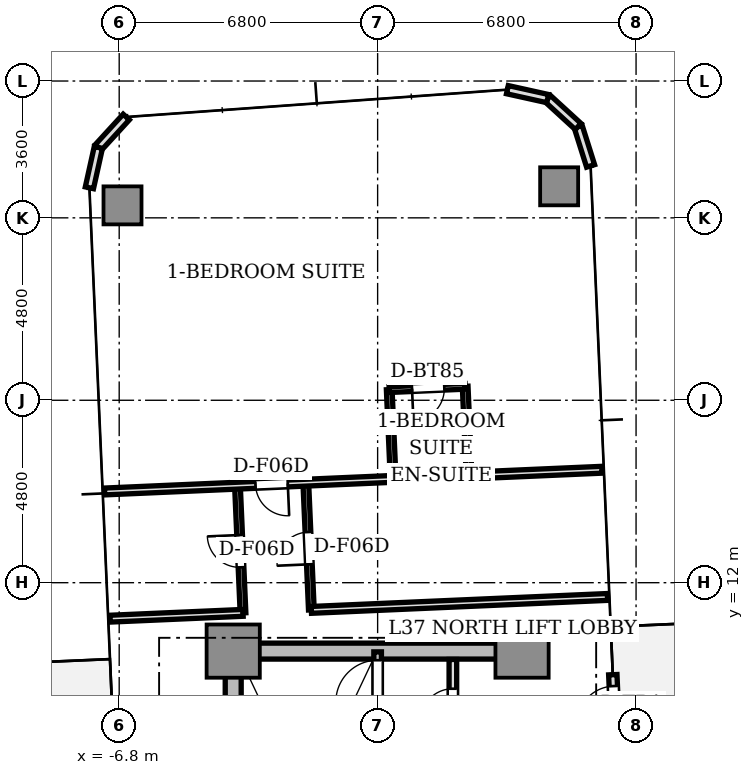
"""IFC4 building model, lengths in metres.
Left out: names, types, materials, properties, quantities, classifications, styles, units other than length and angle.
Written with IfcOpenShell. Run it as: python <this file> out.ifc"""

import sys

from ifc_helpers import new_model, si_unit, direction, frame, frame_2d, origin, origin_2d, place, context, subcontext, project, spatial, rectangle, extrude, source, transform, mapped, element, fill, save


model = new_model("IFC4")
c1 = context("Model", 3, precision=1e-05, world=origin(), true_north=direction((0.0, 1.0)))
c2 = subcontext(c1, "Body", "Model", "MODEL_VIEW")
j1 = project(units=[si_unit("LENGTHUNIT", "METRE"), si_unit("PLANEANGLEUNIT", "RADIAN")], contexts=[c1])
p1 = place(None, origin())
s1 = spatial("IfcSite", under=j1, at=p1, CompositionType="ELEMENT")
p2 = place(p1, origin())
s2 = spatial("IfcBuilding", under=s1, at=p2, CompositionType="ELEMENT")
p3 = place(p2, frame((0.0, 0.0, 134.9)))
s3 = spatial("IfcBuildingStorey", under=s2, at=p3, CompositionType="ELEMENT", Elevation=134.9)
p4 = place(p3, frame((-3.55, 10.2, 0.0), z_axis=(0.0, 0.0, 1.0), x_axis=(1.0, 0.0, 0.0)))
e1 = element("IfcWall", 1, at=p4, inside=s3, PredefinedType="SHEAR", context=c2, shape_type="SweptSolid", body=[
    extrude(rectangle(XDim=7.1, YDim=0.42, at=frame_2d((3.55, 0.0))), origin(), (0.0, 0.0, 1.0), 3.03),
])
p5 = place(p3, frame((-3.8, 2.85, 0.0), z_axis=(0.0, 0.0, 1.0), x_axis=(0.0, 1.0, 0.0)))
e2 = element("IfcWall", 2, at=p5, inside=s3, PredefinedType="SHEAR", context=c2, shape_type="SweptSolid", body=[
    extrude(rectangle(XDim=6.9, YDim=0.42, at=frame_2d((3.45, 0.0))), origin(), (0.0, 0.0, 1.0), 3.03),
])
m1 = source(origin(), c2, "Body", "SweptSolid", [
    extrude(rectangle(XDim=1.4, YDim=1.4, at=origin_2d()), origin(), (0.0, 0.0, 1.0), 3.03),
])
for number, where, z_axis, x_axis in (
    (3, (-3.8, 10.2, 0.0), (0.0, 0.0, 1.0), (1.0, 0.0, 0.0)),
    (4, (3.8, 10.2, 0.0), (0.0, 0.0, 1.0), (1.0, 0.0, 0.0)),
):
    element("IfcColumn", number, at=place(p3, frame(where, z_axis=z_axis, x_axis=x_axis)), inside=s3, PredefinedType="COLUMN", context=c2, shape_type="MappedRepresentation", body=[
        mapped(m1, transform((0.0, 0.0, 0.0), scale=1.0)),
    ])
m2 = source(origin(), c2, "Body", "SweptSolid", [
    extrude(rectangle(XDim=1.0, YDim=1.0, at=origin_2d()), origin(), (0.0, 0.0, 1.0), 3.03),
])
for number, where, z_axis, x_axis in (
    (5, (4.776, 22.43, 0.0), (0.0, 0.0, 1.0), (1.0, 0.0, 0.0)),
    (6, (-6.713, 21.928, 0.0), (0.0, 0.0, 1.0), (1.0, 0.0, 0.0)),
):
    element("IfcColumn", number, at=place(p3, frame(where, z_axis=z_axis, x_axis=x_axis)), inside=s3, PredefinedType="COLUMN", context=c2, shape_type="MappedRepresentation", body=[
        mapped(m2, transform((0.0, 0.0, 0.0), scale=1.0)),
    ])
p6 = place(p3, frame((6.306, 6.882, 0.0), z_axis=(0.0, 0.0, 1.0), x_axis=(-0.043672655174, 0.999045894436, 0.0)))
e7 = element("IfcWall", 7, at=p6, inside=s3, PredefinedType="STANDARD", context=c2, shape_type="SweptSolid", body=[
    extrude(rectangle(XDim=2.7, YDim=0.22, at=frame_2d((1.35, 0.0))), origin(), (0.0, 0.0, 1.0), 3.03),
])
p7 = place(p6, frame((1.4, 0.0, 0.0)))
e8 = element("IfcOpeningElement", 8, at=p7, cuts=e7, PredefinedType="OPENING", context=c2, shape_type="SweptSolid", body=[
    extrude(rectangle(XDim=1.0, YDim=2.2, at=frame_2d((0.5, 1.1))), frame((0.0, 0.12, 0.0), z_axis=(0.0, -1.0, 0.0), x_axis=(1.0, 0.0, 0.0)), (0.0, 0.0, 1.0), 0.24),
])
p8 = place(p3, frame((5.604, 22.966, 0.0), z_axis=(0.0, 0.0, 1.0), x_axis=(-0.300755105707, 0.953701403161, 0.0)))
e9 = element("IfcWall", 9, at=p8, inside=s3, PredefinedType="STANDARD", context=c2, shape_type="SweptSolid", body=[
    extrude(rectangle(XDim=1.087, YDim=0.22, at=frame_2d((0.543, 0.0))), origin(), (0.0, 0.0, 1.0), 3.03),
])
p9 = place(p3, frame((5.277, 24.003, 0.0), z_axis=(0.0, 0.0, 1.0), x_axis=(-0.737312600672, 0.675551721847, 0.0)))
e10 = element("IfcWall", 10, at=p9, inside=s3, PredefinedType="STANDARD", context=c2, shape_type="SweptSolid", body=[
    extrude(rectangle(XDim=1.087, YDim=0.22, at=frame_2d((0.543, 0.0))), origin(), (0.0, 0.0, 1.0), 3.03),
])
for number, where, z_axis, x_axis in (
    (11, (4.475, 24.737, 0.0), (0.0, 0.0, 1.0), (-0.976, 0.217, 0.0)),
    (12, (-6.614, 24.253, 0.0), (0.0, 0.0, 1.0), (-0.676, -0.737, 0.0)),
):
    element("IfcWall", number, at=place(p3, frame(where, z_axis=z_axis, x_axis=x_axis)), inside=s3, PredefinedType="STANDARD", context=c2, shape_type="SweptSolid", body=[
        extrude(rectangle(XDim=1.087, YDim=0.22, at=frame_2d((0.543, 0.0))), origin(), (0.0, 0.0, 1.0), 3.03),
    ])
p10 = place(p3, frame((-7.349, 23.452, 0.0), z_axis=(0.0, 0.0, 1.0), x_axis=(-0.216454939174, -0.976292609471, 0.0)))
e13 = element("IfcWall", 13, at=p10, inside=s3, PredefinedType="STANDARD", context=c2, shape_type="SweptSolid", body=[
    extrude(rectangle(XDim=1.087, YDim=0.22, at=frame_2d((0.544, 0.0))), origin(), (0.0, 0.0, 1.0), 3.03),
])
p11 = place(p3, frame((0.0, 2.5, 0.0), z_axis=(0.0, 0.0, 1.0), x_axis=(0.0, 1.0, 0.0)))
e14 = element("IfcWall", 14, at=p11, inside=s3, PredefinedType="SOLIDWALL", context=c2, shape_type="SweptSolid", body=[
    extrude(rectangle(XDim=7.68, YDim=0.2, at=frame_2d((3.84, 0.0))), origin(), (0.0, 0.0, 1.0), 3.03),
])
p12 = place(p11, frame((6.36, 0.0, 0.0)))
e15 = element("IfcOpeningElement", 15, at=p12, cuts=e14, PredefinedType="OPENING", context=c2, shape_type="SweptSolid", body=[
    extrude(rectangle(XDim=1.1, YDim=2.15, at=frame_2d((0.55, 1.075))), frame((0.0, 0.11, 0.0), z_axis=(0.0, -1.0, 0.0), x_axis=(1.0, 0.0, 0.0)), (0.0, 0.0, 1.0), 0.22),
])
p13 = place(p3, frame((1.98, 5.32, 0.0), z_axis=(0.0, 0.0, 1.0), x_axis=(0.0, 1.0, 0.0)))
e16 = element("IfcWall", 16, at=p13, inside=s3, PredefinedType="SOLIDWALL", context=c2, shape_type="SweptSolid", body=[
    extrude(rectangle(XDim=4.66, YDim=0.2, at=frame_2d((2.33, 0.0))), origin(), (0.0, 0.0, 1.0), 2.58),
])
p14 = place(p13, frame((3.04, 0.0, 0.0)))
e17 = element("IfcOpeningElement", 17, at=p14, cuts=e16, PredefinedType="OPENING", context=c2, shape_type="SweptSolid", body=[
    extrude(rectangle(XDim=0.85, YDim=2.1, at=frame_2d((0.425, 1.05))), frame((0.0, 0.11, 0.0), z_axis=(0.0, -1.0, 0.0), x_axis=(1.0, 0.0, 0.0)), (0.0, 0.0, 1.0), 0.22),
])
p15 = place(p3, frame((-3.542, 11.206, 0.0), z_axis=(0.0, 0.0, 1.0), x_axis=(-0.043582710367, 0.99904982226, 0.0)))
e18 = element("IfcWall", 18, at=p15, inside=s3, PredefinedType="PARTITIONING", context=c2, shape_type="SweptSolid", body=[
    extrude(rectangle(XDim=3.35, YDim=0.15, at=frame_2d((1.675, 0.0))), origin(), (0.0, 0.0, 1.0), 2.58),
])
p16 = place(p15, frame((1.2, 0.0, 0.0)))
e19 = element("IfcOpeningElement", 19, at=p16, cuts=e18, PredefinedType="OPENING", context=c2, shape_type="SweptSolid", body=[
    extrude(rectangle(XDim=0.85, YDim=2.1, at=frame_2d((0.425, 1.05))), frame((0.0, 0.085, 0.0), z_axis=(0.0, -1.0, 0.0), x_axis=(1.0, 0.0, 0.0)), (0.0, 0.0, 1.0), 0.17),
])
p17 = place(p3, frame((-1.744, 11.285, 0.0), z_axis=(0.0, 0.0, 1.0), x_axis=(-0.043579537274, 0.999049960678, 0.0)))
e20 = element("IfcWall", 20, at=p17, inside=s3, PredefinedType="PARTITIONING", context=c2, shape_type="SweptSolid", body=[
    extrude(rectangle(XDim=3.35, YDim=0.15, at=frame_2d((1.675, 0.0))), origin(), (0.0, 0.0, 1.0), 2.58),
])
p18 = place(p17, frame((1.2, 0.0, 0.0)))
e21 = element("IfcOpeningElement", 21, at=p18, cuts=e20, PredefinedType="OPENING", context=c2, shape_type="SweptSolid", body=[
    extrude(rectangle(XDim=0.85, YDim=2.1, at=frame_2d((0.425, 1.05))), frame((0.0, 0.085, 0.0), z_axis=(0.0, -1.0, 0.0), x_axis=(1.0, 0.0, 0.0)), (0.0, 0.0, 1.0), 0.17),
])
p19 = place(p3, frame((-3.542, 11.206, 0.0), z_axis=(0.0, 0.0, 1.0), x_axis=(-0.999046129111, -0.04366728647, 0.0)))
e22 = element("IfcWall", 22, at=p19, inside=s3, PredefinedType="PARTITIONING", context=c2, shape_type="SweptSolid", body=[
    extrude(rectangle(XDim=3.5, YDim=0.18, at=frame_2d((1.75, 0.0))), origin(), (0.0, 0.0, 1.0), 2.58),
])
p20 = place(p3, frame((6.049, 11.625, 0.0), z_axis=(0.0, 0.0, 1.0), x_axis=(-0.999047634936, -0.043632821702, 0.0)))
e23 = element("IfcWall", 23, at=p20, inside=s3, PredefinedType="PARTITIONING", context=c2, shape_type="SweptSolid", body=[
    extrude(rectangle(XDim=7.8, YDim=0.18, at=frame_2d((3.9, 0.0))), origin(), (0.0, 0.0, 1.0), 2.58),
])
p21 = place(p3, frame((5.903, 14.972, 0.0), z_axis=(0.0, 0.0, 1.0), x_axis=(-0.999048653727, -0.043609488494, 0.0)))
e24 = element("IfcWall", 24, at=p21, inside=s3, PredefinedType="PARTITIONING", context=c2, shape_type="SweptSolid", body=[
    extrude(rectangle(XDim=13.1, YDim=0.18, at=frame_2d((6.55, 0.0))), origin(), (0.0, 0.0, 1.0), 2.58),
])
p22 = place(p21, frame((8.275, 0.0, 0.0)))
e25 = element("IfcOpeningElement", 25, at=p22, cuts=e24, PredefinedType="OPENING", context=c2, shape_type="SweptSolid", body=[
    extrude(rectangle(XDim=0.85, YDim=2.1, at=frame_2d((0.425, 1.05))), frame((0.0, 0.1, 0.0), z_axis=(0.0, -1.0, 0.0), x_axis=(1.0, 0.0, 0.0)), (0.0, 0.0, 1.0), 0.2),
])
p23 = place(p3, frame((0.408, 14.732, 0.0), z_axis=(0.0, 0.0, 1.0), x_axis=(-0.043527387554, 0.999052234136, 0.0)))
e26 = element("IfcWall", 26, at=p23, inside=s3, PredefinedType="PARTITIONING", context=c2, shape_type="SweptSolid", body=[
    extrude(rectangle(XDim=2.35, YDim=0.15, at=frame_2d((1.175, 0.0))), origin(), (0.0, 0.0, 1.0), 2.58),
])
p24 = place(p3, frame((2.406, 14.819, 0.0), z_axis=(0.0, 0.0, 1.0), x_axis=(-0.04363560271, 0.999047513473, 0.0)))
e27 = element("IfcWall", 27, at=p24, inside=s3, PredefinedType="PARTITIONING", context=c2, shape_type="SweptSolid", body=[
    extrude(rectangle(XDim=2.35, YDim=0.15, at=frame_2d((1.175, 0.0))), origin(), (0.0, 0.0, 1.0), 2.58),
])
p25 = place(p3, frame((2.303, 17.167, 0.0), z_axis=(0.0, 0.0, 1.0), x_axis=(-0.999049929275, -0.043580257179, 0.0)))
e28 = element("IfcWall", 28, at=p25, inside=s3, PredefinedType="PARTITIONING", context=c2, shape_type="SweptSolid", body=[
    extrude(rectangle(XDim=2.0, YDim=0.15, at=frame_2d((1.0, 0.0))), origin(), (0.0, 0.0, 1.0), 2.58),
])
p26 = place(p25, frame((0.55, 0.0, 0.0)))
e29 = element("IfcOpeningElement", 29, at=p26, cuts=e28, PredefinedType="OPENING", context=c2, shape_type="SweptSolid", body=[
    extrude(rectangle(XDim=0.85, YDim=2.1, at=frame_2d((0.425, 1.05))), frame((0.0, 0.085, 0.0), z_axis=(0.0, -1.0, 0.0), x_axis=(1.0, 0.0, 0.0)), (0.0, 0.0, 1.0), 0.17),
])
m3 = source(origin(), c2, "Body", "SweptSolid", [
    extrude(rectangle(XDim=1.0, YDim=0.05, at=origin_2d()), origin(), (0.0, 0.0, 1.0), 2.2),
])
p27 = place(p7, frame((0.5, 0.0, 0.0)))
e30 = element("IfcDoor", 30, at=p27, inside=s3, OperationType="SINGLE_SWING_LEFT", PredefinedType="DOOR", context=c2, shape_type="MappedRepresentation", body=[
    mapped(m3, transform((0.0, 0.0, 0.0), scale=1.0)),
])
fill(e8, e30)
m4 = source(origin(), c2, "Body", "SweptSolid", [
    extrude(rectangle(XDim=1.1, YDim=0.05, at=origin_2d()), origin(), (0.0, 0.0, 1.0), 2.15),
])
p28 = place(p12, frame((0.55, 0.0, 0.0)))
e31 = element("IfcDoor", 31, at=p28, inside=s3, OperationType="SINGLE_SWING_LEFT", PredefinedType="DOOR", context=c2, shape_type="MappedRepresentation", body=[
    mapped(m4, transform((0.0, 0.0, 0.0), scale=1.0)),
])
fill(e15, e31)
m5 = source(origin(), c2, "Body", "SweptSolid", [
    extrude(rectangle(XDim=0.85, YDim=0.05, at=origin_2d()), origin(), (0.0, 0.0, 1.0), 2.1),
])
p29 = place(p14, frame((0.425, 0.0, 0.0)))
e32 = element("IfcDoor", 32, at=p29, inside=s3, OperationType="SINGLE_SWING_LEFT", PredefinedType="DOOR", context=c2, shape_type="MappedRepresentation", body=[
    mapped(m5, transform((0.0, 0.0, 0.0), scale=1.0)),
])
fill(e17, e32)
p30 = place(p16, frame((0.425, 0.0, 0.0)))
e33 = element("IfcDoor", 33, at=p30, inside=s3, OperationType="SINGLE_SWING_RIGHT", PredefinedType="DOOR", context=c2, shape_type="MappedRepresentation", body=[
    mapped(m5, transform((0.0, 0.0, 0.0), scale=1.0)),
])
fill(e19, e33)
p31 = place(p18, frame((0.425, 0.0, 0.0)))
e34 = element("IfcDoor", 34, at=p31, inside=s3, OperationType="SINGLE_SWING_LEFT", PredefinedType="DOOR", context=c2, shape_type="MappedRepresentation", body=[
    mapped(m5, transform((0.0, 0.0, 0.0), scale=1.0)),
])
fill(e21, e34)
p32 = place(p26, frame((0.425, 0.0, 0.0)))
e35 = element("IfcDoor", 35, at=p32, inside=s3, OperationType="SINGLE_SWING_RIGHT", PredefinedType="DOOR", context=c2, shape_type="MappedRepresentation", body=[
    mapped(m5, transform((0.0, 0.0, 0.0), scale=1.0)),
])
fill(e29, e35)
p33 = place(p22, frame((0.425, 0.0, 0.0)))
e36 = element("IfcDoor", 36, at=p33, inside=s3, OperationType="SINGLE_SWING_LEFT", PredefinedType="DOOR", context=c2, shape_type="MappedRepresentation", body=[
    mapped(m5, transform((0.0, 0.0, 0.0), scale=1.0)),
])
fill(e25, e36)
save(model, sys.argv[1])
